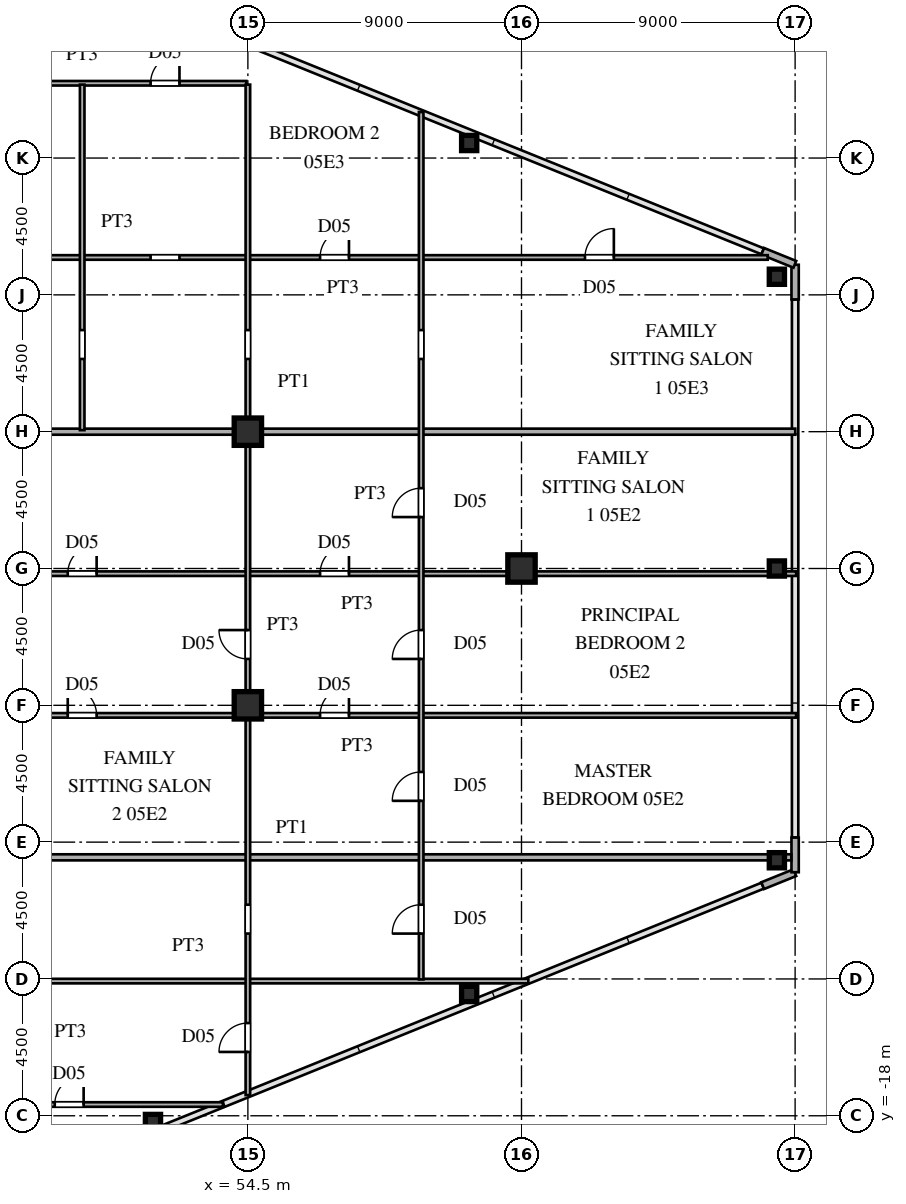
"""IFC4 building model, lengths in metres.
Left out: names, types, materials, properties, quantities, classifications, styles, units other than length and angle.
Written with IfcOpenShell. Run it as: python <this file> out.ifc"""

import sys

from ifc_helpers import new_model, si_unit, direction, frame, frame_2d, origin, origin_2d, place, context, subcontext, project, spatial, rectangle, hollow_rectangle, i_section, extrude, source, transform, mapped, element, fill, save


model = new_model("IFC4")
c1 = context("Model", 3, precision=1e-05, world=origin(), true_north=direction((0.0, 1.0)))
c2 = subcontext(c1, "Body", "Model", "MODEL_VIEW")
j1 = project(units=[si_unit("LENGTHUNIT", "METRE"), si_unit("PLANEANGLEUNIT", "RADIAN")], contexts=[c1])
p1 = place(None, origin())
s1 = spatial("IfcSite", under=j1, at=p1, CompositionType="ELEMENT")
p2 = place(p1, origin())
s2 = spatial("IfcBuilding", under=s1, at=p2, CompositionType="ELEMENT")
p3 = place(p2, frame((0.0, 0.0, 22.5)))
s3 = spatial("IfcBuildingStorey", under=s2, at=p3, CompositionType="ELEMENT", Elevation=22.5)
m1 = source(origin(), c2, "Body", "SweptSolid", [
    extrude(i_section(OverallWidth=0.9, OverallDepth=0.9, WebThickness=0.036, FlangeThickness=0.055, at=origin_2d()), origin(), (0.0, 0.0, 1.0), 3.6),
])
for number, where, z_axis, x_axis in (
    (1, (54.5, -4.5, 0.0), (0.0, 0.0, 1.0), (1.0, 0.0, 0.0)),
    (2, (54.5, 4.5, 0.0), (0.0, 0.0, 1.0), (1.0, 0.0, 0.0)),
    (3, (63.5, 0.0, 0.0), (0.0, 0.0, 1.0), (1.0, 0.0, 0.0)),
):
    element("IfcColumn", number, at=place(p3, frame(where, z_axis=z_axis, x_axis=x_axis)), inside=s3, PredefinedType="COLUMN", context=c2, shape_type="MappedRepresentation", body=[
        mapped(m1, transform((0.0, 0.0, 0.0), scale=1.0)),
    ])
m2 = source(origin(), c2, "Body", "SweptSolid", [
    extrude(hollow_rectangle(XDim=0.5, YDim=0.5, WallThickness=0.02, at=origin_2d()), origin(), (0.0, 0.0, 1.0), 3.6),
])
for number, where, z_axis, x_axis in (
    (4, (71.9, -9.596, 0.0), (0.0, 0.0, 1.0), (1.0, 0.0, 0.0)),
    (5, (71.9, 9.596, 0.0), (0.0, 0.0, 1.0), (1.0, 0.0, 0.0)),
    (6, (51.378, -18.204, 0.0), (0.0, 0.0, 1.0), (1.0, 0.0, 0.0)),
    (7, (61.779, -13.994, 0.0), (0.0, 0.0, 1.0), (1.0, 0.0, 0.0)),
    (8, (61.779, 13.994, 0.0), (0.0, 0.0, 1.0), (1.0, 0.0, 0.0)),
    (9, (71.9, 0.0, 0.0), (0.0, 0.0, 1.0), (1.0, 0.0, 0.0)),
):
    element("IfcColumn", number, at=place(p3, frame(where, z_axis=z_axis, x_axis=x_axis)), inside=s3, PredefinedType="COLUMN", context=c2, shape_type="MappedRepresentation", body=[
        mapped(m2, transform((0.0, 0.0, 0.0), scale=1.0)),
    ])
for number, where, z_axis, x_axis in (
    (10, (71.434, -10.431, 0.0), (0.0, 0.0, 1.0), (0.927, 0.375, 0.0)),
    (11, (72.5, -9.99, 0.0), (0.0, 0.0, 1.0), (0.0, 1.0, 0.0)),
    (12, (72.5, 8.85, 0.0), (0.0, 0.0, 1.0), (0.0, 1.0, 0.0)),
    (13, (72.491, 10.004, 0.0), (0.0, 0.0, 1.0), (-0.927, 0.375, 0.0)),
):
    element("IfcWall", number, at=place(p3, frame(where, z_axis=z_axis, x_axis=x_axis)), inside=s3, PredefinedType="SOLIDWALL", context=c2, shape_type="SweptSolid", body=[
        extrude(rectangle(XDim=1.14, YDim=0.24, at=frame_2d((0.57, 0.0))), origin(), (0.0, 0.0, 1.0), 3.38),
    ])
p4 = place(p3, frame((43.65, -17.63, 0.0), z_axis=(0.0, 0.0, 1.0), x_axis=(1.0, 0.0, 0.0)))
e14 = element("IfcWall", 14, at=p4, inside=s3, PredefinedType="PARTITIONING", context=c2, shape_type="SweptSolid", body=[
    extrude(rectangle(XDim=10.03, YDim=0.15, at=frame_2d((5.015, 0.0))), origin(), (0.0, 0.0, 1.0), 3.38),
])
p5 = place(p4, frame((4.498, 0.0, 0.0)))
e15 = element("IfcOpeningElement", 15, at=p5, cuts=e14, PredefinedType="OPENING", context=c2, shape_type="SweptSolid", body=[
    extrude(rectangle(XDim=0.95, YDim=2.15, at=frame_2d((0.475, 1.075))), frame((0.0, 0.085, 0.0), z_axis=(0.0, -1.0, 0.0), x_axis=(1.0, 0.0, 0.0)), (0.0, 0.0, 1.0), 0.17),
])
p6 = place(p3, frame((43.65, -13.57, 0.0), z_axis=(0.0, 0.0, 1.0), x_axis=(1.0, 0.0, 0.0)))
e16 = element("IfcWall", 16, at=p6, inside=s3, PredefinedType="PARTITIONING", context=c2, shape_type="SweptSolid", body=[
    extrude(rectangle(XDim=20.075, YDim=0.15, at=frame_2d((10.038, 0.0))), origin(), (0.0, 0.0, 1.0), 2.68),
])
p7 = place(p3, frame((39.53, -9.5, 0.0), z_axis=(0.0, 0.0, 1.0), x_axis=(1.0, 0.0, 0.0)))
e17 = element("IfcWall", 17, at=p7, inside=s3, PredefinedType="PARTITIONING", context=c2, shape_type="SweptSolid", body=[
    extrude(rectangle(XDim=32.845, YDim=0.2, at=frame_2d((16.422, 0.0))), origin(), (0.0, 0.0, 1.0), 3.38),
])
p8 = place(p3, frame((43.65, -4.83, 0.0), z_axis=(0.0, 0.0, 1.0), x_axis=(1.0, 0.0, 0.0)))
e18 = element("IfcWall", 18, at=p8, inside=s3, PredefinedType="PARTITIONING", context=c2, shape_type="SweptSolid", body=[
    extrude(rectangle(XDim=28.885, YDim=0.15, at=frame_2d((14.442, 0.0))), origin(), (0.0, 0.0, 1.0), 3.38),
])
p9 = place(p8, frame((4.925, 0.0, 0.0)))
e19 = element("IfcOpeningElement", 19, at=p9, cuts=e18, PredefinedType="OPENING", context=c2, shape_type="SweptSolid", body=[
    extrude(rectangle(XDim=0.95, YDim=2.15, at=frame_2d((0.475, 1.075))), frame((0.0, 0.085, 0.0), z_axis=(0.0, -1.0, 0.0), x_axis=(1.0, 0.0, 0.0)), (0.0, 0.0, 1.0), 0.17),
])
p10 = place(p8, frame((13.225, 0.0, 0.0)))
e20 = element("IfcOpeningElement", 20, at=p10, cuts=e18, PredefinedType="OPENING", context=c2, shape_type="SweptSolid", body=[
    extrude(rectangle(XDim=0.95, YDim=2.15, at=frame_2d((0.475, 1.075))), frame((0.0, 0.085, 0.0), z_axis=(0.0, -1.0, 0.0), x_axis=(1.0, 0.0, 0.0)), (0.0, 0.0, 1.0), 0.17),
])
p11 = place(p3, frame((43.65, -0.17, 0.0), z_axis=(0.0, 0.0, 1.0), x_axis=(1.0, 0.0, 0.0)))
e21 = element("IfcWall", 21, at=p11, inside=s3, PredefinedType="PARTITIONING", context=c2, shape_type="SweptSolid", body=[
    extrude(rectangle(XDim=28.885, YDim=0.15, at=frame_2d((14.442, 0.0))), origin(), (0.0, 0.0, 1.0), 3.38),
])
p12 = place(p11, frame((4.925, 0.0, 0.0)))
e22 = element("IfcOpeningElement", 22, at=p12, cuts=e21, PredefinedType="OPENING", context=c2, shape_type="SweptSolid", body=[
    extrude(rectangle(XDim=0.95, YDim=2.15, at=frame_2d((0.475, 1.075))), frame((0.0, 0.085, 0.0), z_axis=(0.0, -1.0, 0.0), x_axis=(1.0, 0.0, 0.0)), (0.0, 0.0, 1.0), 0.17),
])
p13 = place(p11, frame((13.225, 0.0, 0.0)))
e23 = element("IfcOpeningElement", 23, at=p13, cuts=e21, PredefinedType="OPENING", context=c2, shape_type="SweptSolid", body=[
    extrude(rectangle(XDim=0.95, YDim=2.15, at=frame_2d((0.475, 1.075))), frame((0.0, 0.085, 0.0), z_axis=(0.0, -1.0, 0.0), x_axis=(1.0, 0.0, 0.0)), (0.0, 0.0, 1.0), 0.17),
])
p14 = place(p3, frame((39.53, 4.5, 0.0), z_axis=(0.0, 0.0, 1.0), x_axis=(1.0, 0.0, 0.0)))
e24 = element("IfcWall", 24, at=p14, inside=s3, PredefinedType="PARTITIONING", context=c2, shape_type="SweptSolid", body=[
    extrude(rectangle(XDim=14.99, YDim=0.2, at=frame_2d((7.495, 0.0))), origin(), (0.0, 0.0, 1.0), 2.68),
])
p15 = place(p3, frame((54.52, 4.5, 0.0), z_axis=(0.0, 0.0, 1.0), x_axis=(1.0, 0.0, 0.0)))
e25 = element("IfcWall", 25, at=p15, inside=s3, PredefinedType="PARTITIONING", context=c2, shape_type="SweptSolid", body=[
    extrude(rectangle(XDim=17.985, YDim=0.2, at=frame_2d((8.992, 0.0))), origin(), (0.0, 0.0, 1.0), 3.38),
])
p16 = place(p3, frame((43.65, 10.23, 0.0), z_axis=(0.0, 0.0, 1.0), x_axis=(1.0, 0.0, 0.0)))
e26 = element("IfcWall", 26, at=p16, inside=s3, PredefinedType="PARTITIONING", context=c2, shape_type="SweptSolid", body=[
    extrude(rectangle(XDim=27.949, YDim=0.15, at=frame_2d((13.974, 0.0))), origin(), (0.0, 0.0, 1.0), 3.38),
])
p17 = place(p16, frame((21.938, 0.0, 0.0)))
e27 = element("IfcOpeningElement", 27, at=p17, cuts=e26, PredefinedType="OPENING", context=c2, shape_type="SweptSolid", body=[
    extrude(rectangle(XDim=0.95, YDim=2.15, at=frame_2d((0.475, 1.075))), frame((0.0, 0.085, 0.0), z_axis=(0.0, -1.0, 0.0), x_axis=(1.0, 0.0, 0.0)), (0.0, 0.0, 1.0), 0.17),
])
p18 = place(p16, frame((13.225, 0.0, 0.0)))
e28 = element("IfcOpeningElement", 28, at=p18, cuts=e26, PredefinedType="OPENING", context=c2, shape_type="SweptSolid", body=[
    extrude(rectangle(XDim=0.95, YDim=2.15, at=frame_2d((0.475, 1.075))), frame((0.0, 0.085, 0.0), z_axis=(0.0, -1.0, 0.0), x_axis=(1.0, 0.0, 0.0)), (0.0, 0.0, 1.0), 0.17),
])
p19 = place(p16, frame((7.65, 0.0, 0.0)))
e29 = element("IfcOpeningElement", 29, at=p19, cuts=e26, PredefinedType="OPENING", context=c2, shape_type="SweptSolid", body=[
    extrude(rectangle(XDim=0.95, YDim=2.15, at=frame_2d((0.475, 1.075))), frame((0.0, 0.085, 0.0), z_axis=(0.0, -1.0, 0.0), x_axis=(1.0, 0.0, 0.0)), (0.0, 0.0, 1.0), 0.17),
])
p20 = place(p3, frame((43.65, 15.96, 0.0), z_axis=(0.0, 0.0, 1.0), x_axis=(1.0, 0.0, 0.0)))
e30 = element("IfcWall", 30, at=p20, inside=s3, PredefinedType="PARTITIONING", context=c2, shape_type="SweptSolid", body=[
    extrude(rectangle(XDim=10.8, YDim=0.15, at=frame_2d((5.4, 0.0))), origin(), (0.0, 0.0, 1.0), 3.38),
])
p21 = place(p20, frame((7.65, 0.0, 0.0)))
e31 = element("IfcOpeningElement", 31, at=p21, cuts=e30, PredefinedType="OPENING", context=c2, shape_type="SweptSolid", body=[
    extrude(rectangle(XDim=0.95, YDim=2.15, at=frame_2d((0.475, 1.075))), frame((0.0, 0.085, 0.0), z_axis=(0.0, -1.0, 0.0), x_axis=(1.0, 0.0, 0.0)), (0.0, 0.0, 1.0), 0.17),
])
p22 = place(p3, frame((49.05, 4.55, 0.0), z_axis=(0.0, 0.0, 1.0), x_axis=(0.0, 1.0, 0.0)))
e32 = element("IfcWall", 32, at=p22, inside=s3, PredefinedType="PARTITIONING", context=c2, shape_type="SweptSolid", body=[
    extrude(rectangle(XDim=11.365, YDim=0.15, at=frame_2d((5.683, 0.0))), origin(), (0.0, 0.0, 1.0), 3.38),
])
p23 = place(p22, frame((2.341, 0.0, 0.0)))
e33 = element("IfcOpeningElement", 33, at=p23, cuts=e32, PredefinedType="OPENING", context=c2, shape_type="SweptSolid", body=[
    extrude(rectangle(XDim=0.95, YDim=2.15, at=frame_2d((0.475, 1.075))), frame((0.0, 0.085, 0.0), z_axis=(0.0, -1.0, 0.0), x_axis=(1.0, 0.0, 0.0)), (0.0, 0.0, 1.0), 0.17),
])
p24 = place(p3, frame((54.5, -17.321, 0.0), z_axis=(0.0, 0.0, 1.0), x_axis=(0.0, 1.0, 0.0)))
e34 = element("IfcWall", 34, at=p24, inside=s3, PredefinedType="PARTITIONING", context=c2, shape_type="SweptSolid", body=[
    extrude(rectangle(XDim=33.236, YDim=0.15, at=frame_2d((16.618, 0.0))), origin(), (0.0, 0.0, 1.0), 2.68),
])
p25 = place(p24, frame((1.42, 0.0, 0.0)))
e35 = element("IfcOpeningElement", 35, at=p25, cuts=e34, PredefinedType="OPENING", context=c2, shape_type="SweptSolid", body=[
    extrude(rectangle(XDim=0.95, YDim=2.15, at=frame_2d((0.475, 1.075))), frame((0.0, 0.085, 0.0), z_axis=(0.0, -1.0, 0.0), x_axis=(1.0, 0.0, 0.0)), (0.0, 0.0, 1.0), 0.17),
])
p26 = place(p24, frame((5.313, 0.0, 0.0)))
e36 = element("IfcOpeningElement", 36, at=p26, cuts=e34, PredefinedType="OPENING", context=c2, shape_type="SweptSolid", body=[
    extrude(rectangle(XDim=0.95, YDim=2.15, at=frame_2d((0.475, 1.075))), frame((0.0, 0.085, 0.0), z_axis=(0.0, -1.0, 0.0), x_axis=(1.0, 0.0, 0.0)), (0.0, 0.0, 1.0), 0.17),
])
p27 = place(p24, frame((14.346, 0.0, 0.0)))
e37 = element("IfcOpeningElement", 37, at=p27, cuts=e34, PredefinedType="OPENING", context=c2, shape_type="SweptSolid", body=[
    extrude(rectangle(XDim=0.95, YDim=2.15, at=frame_2d((0.475, 1.075))), frame((0.0, 0.085, 0.0), z_axis=(0.0, -1.0, 0.0), x_axis=(1.0, 0.0, 0.0)), (0.0, 0.0, 1.0), 0.17),
])
p28 = place(p24, frame((24.212, 0.0, 0.0)))
e38 = element("IfcOpeningElement", 38, at=p28, cuts=e34, PredefinedType="OPENING", context=c2, shape_type="SweptSolid", body=[
    extrude(rectangle(XDim=0.95, YDim=2.15, at=frame_2d((0.475, 1.075))), frame((0.0, 0.085, 0.0), z_axis=(0.0, -1.0, 0.0), x_axis=(1.0, 0.0, 0.0)), (0.0, 0.0, 1.0), 0.17),
])
p29 = place(p3, frame((60.2, -13.516, 0.0), z_axis=(0.0, 0.0, 1.0), x_axis=(0.0, 1.0, 0.0)))
e39 = element("IfcWall", 39, at=p29, inside=s3, PredefinedType="PARTITIONING", context=c2, shape_type="SweptSolid", body=[
    extrude(rectangle(XDim=28.53, YDim=0.15, at=frame_2d((14.265, 0.0))), origin(), (0.0, 0.0, 1.0), 3.38),
])
p30 = place(p29, frame((1.508, 0.0, 0.0)))
e40 = element("IfcOpeningElement", 40, at=p30, cuts=e39, PredefinedType="OPENING", context=c2, shape_type="SweptSolid", body=[
    extrude(rectangle(XDim=0.95, YDim=2.15, at=frame_2d((0.475, 1.075))), frame((0.0, 0.085, 0.0), z_axis=(0.0, -1.0, 0.0), x_axis=(1.0, 0.0, 0.0)), (0.0, 0.0, 1.0), 0.17),
])
p31 = place(p29, frame((5.875, 0.0, 0.0)))
e41 = element("IfcOpeningElement", 41, at=p31, cuts=e39, PredefinedType="OPENING", context=c2, shape_type="SweptSolid", body=[
    extrude(rectangle(XDim=0.95, YDim=2.15, at=frame_2d((0.475, 1.075))), frame((0.0, 0.085, 0.0), z_axis=(0.0, -1.0, 0.0), x_axis=(1.0, 0.0, 0.0)), (0.0, 0.0, 1.0), 0.17),
])
p32 = place(p29, frame((10.541, 0.0, 0.0)))
e42 = element("IfcOpeningElement", 42, at=p32, cuts=e39, PredefinedType="OPENING", context=c2, shape_type="SweptSolid", body=[
    extrude(rectangle(XDim=0.95, YDim=2.15, at=frame_2d((0.475, 1.075))), frame((0.0, 0.085, 0.0), z_axis=(0.0, -1.0, 0.0), x_axis=(1.0, 0.0, 0.0)), (0.0, 0.0, 1.0), 0.17),
])
p33 = place(p29, frame((15.208, 0.0, 0.0)))
e43 = element("IfcOpeningElement", 43, at=p33, cuts=e39, PredefinedType="OPENING", context=c2, shape_type="SweptSolid", body=[
    extrude(rectangle(XDim=0.95, YDim=2.15, at=frame_2d((0.475, 1.075))), frame((0.0, 0.085, 0.0), z_axis=(0.0, -1.0, 0.0), x_axis=(1.0, 0.0, 0.0)), (0.0, 0.0, 1.0), 0.17),
])
p34 = place(p29, frame((20.407, 0.0, 0.0)))
e44 = element("IfcOpeningElement", 44, at=p34, cuts=e39, PredefinedType="OPENING", context=c2, shape_type="SweptSolid", body=[
    extrude(rectangle(XDim=0.95, YDim=2.15, at=frame_2d((0.475, 1.075))), frame((0.0, 0.085, 0.0), z_axis=(0.0, -1.0, 0.0), x_axis=(1.0, 0.0, 0.0)), (0.0, 0.0, 1.0), 0.17),
])
m3 = source(origin(), c2, "Body", "SweptSolid", [
    extrude(rectangle(XDim=0.95, YDim=2.15, at=frame_2d((0.475, 1.075))), frame((0.0, 0.025, 0.0), z_axis=(0.0, -1.0, 0.0), x_axis=(1.0, 0.0, 0.0)), (0.0, 0.0, 1.0), 0.05),
])
p35 = place(p5, origin())
e45 = element("IfcDoor", 45, at=p35, inside=s3, OperationType="SINGLE_SWING_RIGHT", PredefinedType="DOOR", context=c2, shape_type="MappedRepresentation", body=[
    mapped(m3, transform((0.0, 0.0, 0.0), scale=1.0)),
])
fill(e15, e45)
p36 = place(p9, origin())
e46 = element("IfcDoor", 46, at=p36, inside=s3, OperationType="SINGLE_SWING_LEFT", PredefinedType="DOOR", context=c2, shape_type="MappedRepresentation", body=[
    mapped(m3, transform((0.0, 0.0, 0.0), scale=1.0)),
])
fill(e19, e46)
p37 = place(p10, origin())
e47 = element("IfcDoor", 47, at=p37, inside=s3, OperationType="SINGLE_SWING_RIGHT", PredefinedType="DOOR", context=c2, shape_type="MappedRepresentation", body=[
    mapped(m3, transform((0.0, 0.0, 0.0), scale=1.0)),
])
fill(e20, e47)
p38 = place(p12, origin())
e48 = element("IfcDoor", 48, at=p38, inside=s3, OperationType="SINGLE_SWING_RIGHT", PredefinedType="DOOR", context=c2, shape_type="MappedRepresentation", body=[
    mapped(m3, transform((0.0, 0.0, 0.0), scale=1.0)),
])
fill(e22, e48)
p39 = place(p13, origin())
e49 = element("IfcDoor", 49, at=p39, inside=s3, OperationType="SINGLE_SWING_RIGHT", PredefinedType="DOOR", context=c2, shape_type="MappedRepresentation", body=[
    mapped(m3, transform((0.0, 0.0, 0.0), scale=1.0)),
])
fill(e23, e49)
p40 = place(p17, origin())
e50 = element("IfcDoor", 50, at=p40, inside=s3, OperationType="SINGLE_SWING_RIGHT", PredefinedType="DOOR", context=c2, shape_type="MappedRepresentation", body=[
    mapped(m3, transform((0.0, 0.0, 0.0), scale=1.0)),
])
fill(e27, e50)
p41 = place(p18, origin())
e51 = element("IfcDoor", 51, at=p41, inside=s3, OperationType="SINGLE_SWING_RIGHT", PredefinedType="DOOR", context=c2, shape_type="MappedRepresentation", body=[
    mapped(m3, transform((0.0, 0.0, 0.0), scale=1.0)),
])
fill(e28, e51)
p42 = place(p21, origin())
e52 = element("IfcDoor", 52, at=p42, inside=s3, OperationType="SINGLE_SWING_RIGHT", PredefinedType="DOOR", context=c2, shape_type="MappedRepresentation", body=[
    mapped(m3, transform((0.0, 0.0, 0.0), scale=1.0)),
])
fill(e31, e52)
p43 = place(p25, origin())
e53 = element("IfcDoor", 53, at=p43, inside=s3, OperationType="SINGLE_SWING_LEFT", PredefinedType="DOOR", context=c2, shape_type="MappedRepresentation", body=[
    mapped(m3, transform((0.0, 0.0, 0.0), scale=1.0)),
])
fill(e35, e53)
p44 = place(p27, origin())
e54 = element("IfcDoor", 54, at=p44, inside=s3, OperationType="SINGLE_SWING_RIGHT", PredefinedType="DOOR", context=c2, shape_type="MappedRepresentation", body=[
    mapped(m3, transform((0.0, 0.0, 0.0), scale=1.0)),
])
fill(e37, e54)
p45 = place(p30, origin())
e55 = element("IfcDoor", 55, at=p45, inside=s3, OperationType="SINGLE_SWING_LEFT", PredefinedType="DOOR", context=c2, shape_type="MappedRepresentation", body=[
    mapped(m3, transform((0.0, 0.0, 0.0), scale=1.0)),
])
fill(e40, e55)
p46 = place(p31, origin())
e56 = element("IfcDoor", 56, at=p46, inside=s3, OperationType="SINGLE_SWING_LEFT", PredefinedType="DOOR", context=c2, shape_type="MappedRepresentation", body=[
    mapped(m3, transform((0.0, 0.0, 0.0), scale=1.0)),
])
fill(e41, e56)
p47 = place(p32, origin())
e57 = element("IfcDoor", 57, at=p47, inside=s3, OperationType="SINGLE_SWING_LEFT", PredefinedType="DOOR", context=c2, shape_type="MappedRepresentation", body=[
    mapped(m3, transform((0.0, 0.0, 0.0), scale=1.0)),
])
fill(e42, e57)
p48 = place(p33, origin())
e58 = element("IfcDoor", 58, at=p48, inside=s3, OperationType="SINGLE_SWING_LEFT", PredefinedType="DOOR", context=c2, shape_type="MappedRepresentation", body=[
    mapped(m3, transform((0.0, 0.0, 0.0), scale=1.0)),
])
fill(e43, e58)
save(model, sys.argv[1])
